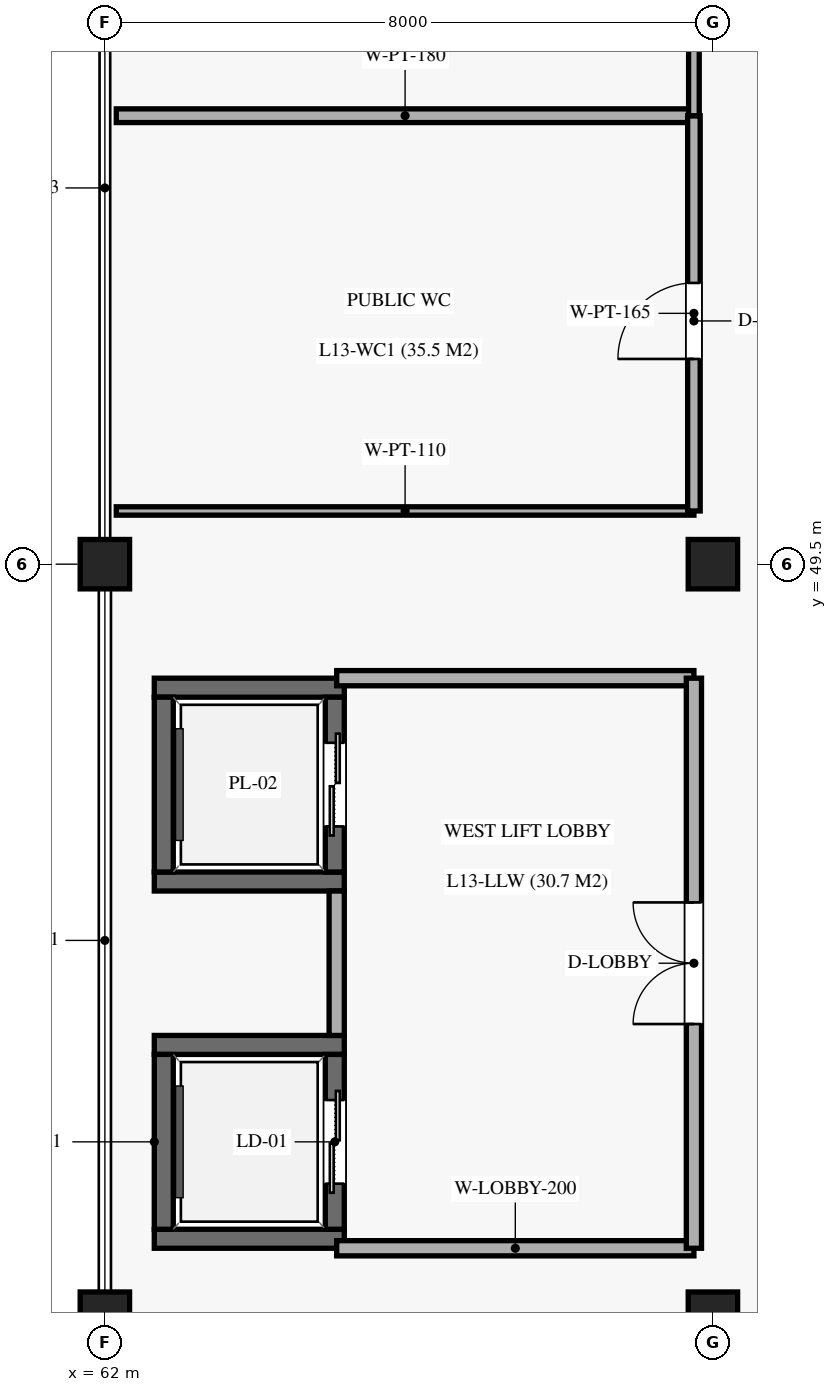
"""IFC4 building model, lengths in metres.
Left out: names, types, materials, properties, quantities, classifications, styles, units other than length and angle.
Written with IfcOpenShell. Run it as: python <this file> out.ifc"""

import sys

from ifc_helpers import new_model, si_unit, direction, frame, frame_2d, origin, origin_2d, place, context, subcontext, project, spatial, rectangle, extrude, element, fill, save


model = new_model("IFC4")
c1 = context("Model", 3, precision=1e-05, world=origin(), true_north=direction((0.0, 1.0)))
c2 = subcontext(c1, "Body", "Model", "MODEL_VIEW")
j1 = project(units=[si_unit("LENGTHUNIT", "METRE"), si_unit("PLANEANGLEUNIT", "RADIAN")], contexts=[c1])
p1 = place(None, origin())
s1 = spatial("IfcSite", under=j1, at=p1, CompositionType="ELEMENT")
p2 = place(p1, origin())
s2 = spatial("IfcBuilding", under=s1, at=p2, CompositionType="ELEMENT")
p3 = place(p2, frame((0.0, 0.0, 66.3)))
s3 = spatial("IfcBuildingStorey", under=s2, at=p3, CompositionType="ELEMENT", Elevation=66.3)
for number, where, z_axis, x_axis in (
    (1, (62.0, 39.6, 0.0), (0.0, 0.0, 1.0), (1.0, 0.0, 0.0)),
    (2, (62.0, 49.5, 0.0), (0.0, 0.0, 1.0), (1.0, 0.0, 0.0)),
    (3, (70.0, 39.6, 0.0), (0.0, 0.0, 1.0), (1.0, 0.0, 0.0)),
    (4, (70.0, 49.5, 0.0), (0.0, 0.0, 1.0), (1.0, 0.0, 0.0)),
):
    element("IfcColumn", number, at=place(p3, frame(where, z_axis=z_axis, x_axis=x_axis)), inside=s3, PredefinedType="COLUMN", context=c2, shape_type="SweptSolid", body=[
        extrude(rectangle(XDim=0.65, YDim=0.65, at=origin_2d()), origin(), (0.0, 0.0, 1.0), 4.08),
    ])
for number, where, z_axis, x_axis in (
    (5, (62.65, 40.625, 0.0), (0.0, 0.0, 1.0), (1.0, 0.0, 0.0)),
    (6, (62.65, 43.175, 0.0), (0.0, 0.0, 1.0), (1.0, 0.0, 0.0)),
):
    element("IfcWall", number, at=place(p3, frame(where, z_axis=z_axis, x_axis=x_axis)), inside=s3, PredefinedType="SOLIDWALL", context=c2, shape_type="SweptSolid", body=[
        extrude(rectangle(XDim=2.5, YDim=0.25, at=frame_2d((1.25, 0.0))), origin(), (0.0, 0.0, 1.0), 3.81),
    ])
p4 = place(p3, frame((62.775, 40.75, 0.0), z_axis=(0.0, 0.0, 1.0), x_axis=(0.0, 1.0, 0.0)))
e7 = element("IfcWall", 7, at=p4, inside=s3, PredefinedType="SOLIDWALL", context=c2, shape_type="SweptSolid", body=[
    extrude(rectangle(XDim=2.3, YDim=0.25, at=frame_2d((1.15, 0.0))), origin(), (0.0, 0.0, 1.0), 3.81),
])
p5 = place(p3, frame((65.025, 40.75, 0.0), z_axis=(0.0, 0.0, 1.0), x_axis=(0.0, 1.0, 0.0)))
e8 = element("IfcWall", 8, at=p5, inside=s3, PredefinedType="SOLIDWALL", context=c2, shape_type="SweptSolid", body=[
    extrude(rectangle(XDim=2.3, YDim=0.25, at=frame_2d((1.15, 0.0))), origin(), (0.0, 0.0, 1.0), 3.81),
])
p6 = place(p5, frame((0.6, 0.0, 0.0)))
e9 = element("IfcOpeningElement", 9, at=p6, cuts=e8, PredefinedType="OPENING", context=c2, shape_type="SweptSolid", body=[
    extrude(rectangle(XDim=1.1, YDim=2.2, at=frame_2d((0.55, 1.1))), frame((0.0, 0.135, 0.0), z_axis=(0.0, -1.0, 0.0), x_axis=(1.0, 0.0, 0.0)), (0.0, 0.0, 1.0), 0.27),
])
for number, where, z_axis, x_axis in (
    (10, (62.65, 45.325, 0.0), (0.0, 0.0, 1.0), (1.0, 0.0, 0.0)),
    (11, (62.65, 47.875, 0.0), (0.0, 0.0, 1.0), (1.0, 0.0, 0.0)),
):
    element("IfcWall", number, at=place(p3, frame(where, z_axis=z_axis, x_axis=x_axis)), inside=s3, PredefinedType="SOLIDWALL", context=c2, shape_type="SweptSolid", body=[
        extrude(rectangle(XDim=2.5, YDim=0.25, at=frame_2d((1.25, 0.0))), origin(), (0.0, 0.0, 1.0), 3.81),
    ])
p7 = place(p3, frame((62.775, 45.45, 0.0), z_axis=(0.0, 0.0, 1.0), x_axis=(0.0, 1.0, 0.0)))
e12 = element("IfcWall", 12, at=p7, inside=s3, PredefinedType="SOLIDWALL", context=c2, shape_type="SweptSolid", body=[
    extrude(rectangle(XDim=2.3, YDim=0.25, at=frame_2d((1.15, 0.0))), origin(), (0.0, 0.0, 1.0), 3.81),
])
p8 = place(p3, frame((65.025, 45.45, 0.0), z_axis=(0.0, 0.0, 1.0), x_axis=(0.0, 1.0, 0.0)))
e13 = element("IfcWall", 13, at=p8, inside=s3, PredefinedType="SOLIDWALL", context=c2, shape_type="SweptSolid", body=[
    extrude(rectangle(XDim=2.3, YDim=0.25, at=frame_2d((1.15, 0.0))), origin(), (0.0, 0.0, 1.0), 3.81),
])
p9 = place(p8, frame((0.6, 0.0, 0.0)))
e14 = element("IfcOpeningElement", 14, at=p9, cuts=e13, PredefinedType="OPENING", context=c2, shape_type="SweptSolid", body=[
    extrude(rectangle(XDim=1.1, YDim=2.2, at=frame_2d((0.55, 1.1))), frame((0.0, 0.135, 0.0), z_axis=(0.0, -1.0, 0.0), x_axis=(1.0, 0.0, 0.0)), (0.0, 0.0, 1.0), 0.27),
])
for number, where, z_axis, x_axis in (
    (15, (65.05, 40.5, 0.0), (0.0, 0.0, 1.0), (1.0, 0.0, 0.0)),
    (16, (65.05, 48.0, 0.0), (0.0, 0.0, 1.0), (1.0, 0.0, 0.0)),
):
    element("IfcWall", number, at=place(p3, frame(where, z_axis=z_axis, x_axis=x_axis)), inside=s3, PredefinedType="SOLIDWALL", context=c2, shape_type="SweptSolid", body=[
        extrude(rectangle(XDim=4.7, YDim=0.2, at=frame_2d((2.35, 0.0))), origin(), (0.0, 0.0, 1.0), 2.95),
    ])
p10 = place(p3, frame((65.05, 43.3, 0.0), z_axis=(0.0, 0.0, 1.0), x_axis=(0.0, 1.0, 0.0)))
e17 = element("IfcWall", 17, at=p10, inside=s3, PredefinedType="SOLIDWALL", context=c2, shape_type="SweptSolid", body=[
    extrude(rectangle(XDim=1.9, YDim=0.2, at=frame_2d((0.95, 0.0))), origin(), (0.0, 0.0, 1.0), 2.95),
])
p11 = place(p3, frame((69.75, 40.5, 0.0), z_axis=(0.0, 0.0, 1.0), x_axis=(0.0, 1.0, 0.0)))
e18 = element("IfcWall", 18, at=p11, inside=s3, PredefinedType="SOLIDWALL", context=c2, shape_type="SweptSolid", body=[
    extrude(rectangle(XDim=7.5, YDim=0.2, at=frame_2d((3.75, 0.0))), origin(), (0.0, 0.0, 1.0), 2.95),
])
p12 = place(p11, frame((2.95, 0.0, 0.0)))
e19 = element("IfcOpeningElement", 19, at=p12, cuts=e18, PredefinedType="OPENING", context=c2, shape_type="SweptSolid", body=[
    extrude(rectangle(XDim=1.6, YDim=2.2, at=frame_2d((0.8, 1.1))), frame((0.0, 0.11, 0.0), z_axis=(0.0, -1.0, 0.0), x_axis=(1.0, 0.0, 0.0)), (0.0, 0.0, 1.0), 0.22),
])
p13 = place(p3, frame((62.15, 50.2, 0.0), z_axis=(0.0, 0.0, 1.0), x_axis=(1.0, 0.0, 0.0)))
e20 = element("IfcWall", 20, at=p13, inside=s3, PredefinedType="PARTITIONING", context=c2, shape_type="SweptSolid", body=[
    extrude(rectangle(XDim=7.6, YDim=0.11, at=frame_2d((3.8, 0.0))), origin(), (0.0, 0.0, 1.0), 2.95),
])
p14 = place(p3, frame((62.15, 55.4, 0.0), z_axis=(0.0, 0.0, 1.0), x_axis=(1.0, 0.0, 0.0)))
e21 = element("IfcWall", 21, at=p14, inside=s3, PredefinedType="PARTITIONING", context=c2, shape_type="SweptSolid", body=[
    extrude(rectangle(XDim=7.6, YDim=0.18, at=frame_2d((3.8, 0.0))), origin(), (0.0, 0.0, 1.0), 2.95),
])
p15 = place(p3, frame((69.75, 50.2, 0.0), z_axis=(0.0, 0.0, 1.0), x_axis=(0.0, 1.0, 0.0)))
e22 = element("IfcWall", 22, at=p15, inside=s3, PredefinedType="PARTITIONING", context=c2, shape_type="SweptSolid", body=[
    extrude(rectangle(XDim=5.2, YDim=0.165, at=frame_2d((2.6, 0.0))), origin(), (0.0, 0.0, 1.0), 2.95),
])
p16 = place(p15, frame((2.0, 0.0, 0.0)))
e23 = element("IfcOpeningElement", 23, at=p16, cuts=e22, PredefinedType="OPENING", context=c2, shape_type="SweptSolid", body=[
    extrude(rectangle(XDim=1.0, YDim=2.1, at=frame_2d((0.5, 1.05))), frame((0.0, 0.093, 0.0), z_axis=(0.0, -1.0, 0.0), x_axis=(1.0, 0.0, 0.0)), (0.0, 0.0, 1.0), 0.185),
])
p17 = place(p3, frame((69.75, 55.4, 0.0), z_axis=(0.0, 0.0, 1.0), x_axis=(0.0, 1.0, 0.0)))
e24 = element("IfcWall", 24, at=p17, inside=s3, PredefinedType="PARTITIONING", context=c2, shape_type="SweptSolid", body=[
    extrude(rectangle(XDim=3.5, YDim=0.14, at=frame_2d((1.75, 0.0))), origin(), (0.0, 0.0, 1.0), 2.95),
])
p18 = place(p17, frame((1.15, 0.0, 0.0)))
e25 = element("IfcOpeningElement", 25, at=p18, cuts=e24, PredefinedType="OPENING", context=c2, shape_type="SweptSolid", body=[
    extrude(rectangle(XDim=1.05, YDim=2.15, at=frame_2d((0.525, 1.075))), frame((0.0, 0.08, 0.0), z_axis=(0.0, -1.0, 0.0), x_axis=(1.0, 0.0, 0.0)), (0.0, 0.0, 1.0), 0.16),
])
p19 = place(p6, origin())
e26 = element("IfcDoor", 26, at=p19, inside=s3, OperationType="DOUBLE_DOOR_SLIDING", PredefinedType="DOOR", context=c2, shape_type="SweptSolid", body=[
    extrude(rectangle(XDim=1.1, YDim=2.2, at=frame_2d((0.55, 1.1))), frame((0.0, 0.025, 0.0), z_axis=(0.0, -1.0, 0.0), x_axis=(1.0, 0.0, 0.0)), (0.0, 0.0, 1.0), 0.05),
])
fill(e9, e26)
p20 = place(p9, origin())
e27 = element("IfcDoor", 27, at=p20, inside=s3, OperationType="DOUBLE_DOOR_SLIDING", PredefinedType="DOOR", context=c2, shape_type="SweptSolid", body=[
    extrude(rectangle(XDim=1.1, YDim=2.2, at=frame_2d((0.55, 1.1))), frame((0.0, 0.025, 0.0), z_axis=(0.0, -1.0, 0.0), x_axis=(1.0, 0.0, 0.0)), (0.0, 0.0, 1.0), 0.05),
])
fill(e14, e27)
p21 = place(p12, origin())
e28 = element("IfcDoor", 28, at=p21, inside=s3, OperationType="DOUBLE_DOOR_SINGLE_SWING", PredefinedType="DOOR", context=c2, shape_type="SweptSolid", body=[
    extrude(rectangle(XDim=1.6, YDim=2.2, at=frame_2d((0.8, 1.1))), frame((0.0, 0.025, 0.0), z_axis=(0.0, -1.0, 0.0), x_axis=(1.0, 0.0, 0.0)), (0.0, 0.0, 1.0), 0.05),
])
fill(e19, e28)
p22 = place(p16, origin())
e29 = element("IfcDoor", 29, at=p22, inside=s3, OperationType="SINGLE_SWING_LEFT", PredefinedType="DOOR", context=c2, shape_type="SweptSolid", body=[
    extrude(rectangle(XDim=1.0, YDim=2.1, at=frame_2d((0.5, 1.05))), frame((0.0, 0.025, 0.0), z_axis=(0.0, -1.0, 0.0), x_axis=(1.0, 0.0, 0.0)), (0.0, 0.0, 1.0), 0.05),
])
fill(e23, e29)
save(model, sys.argv[1])
